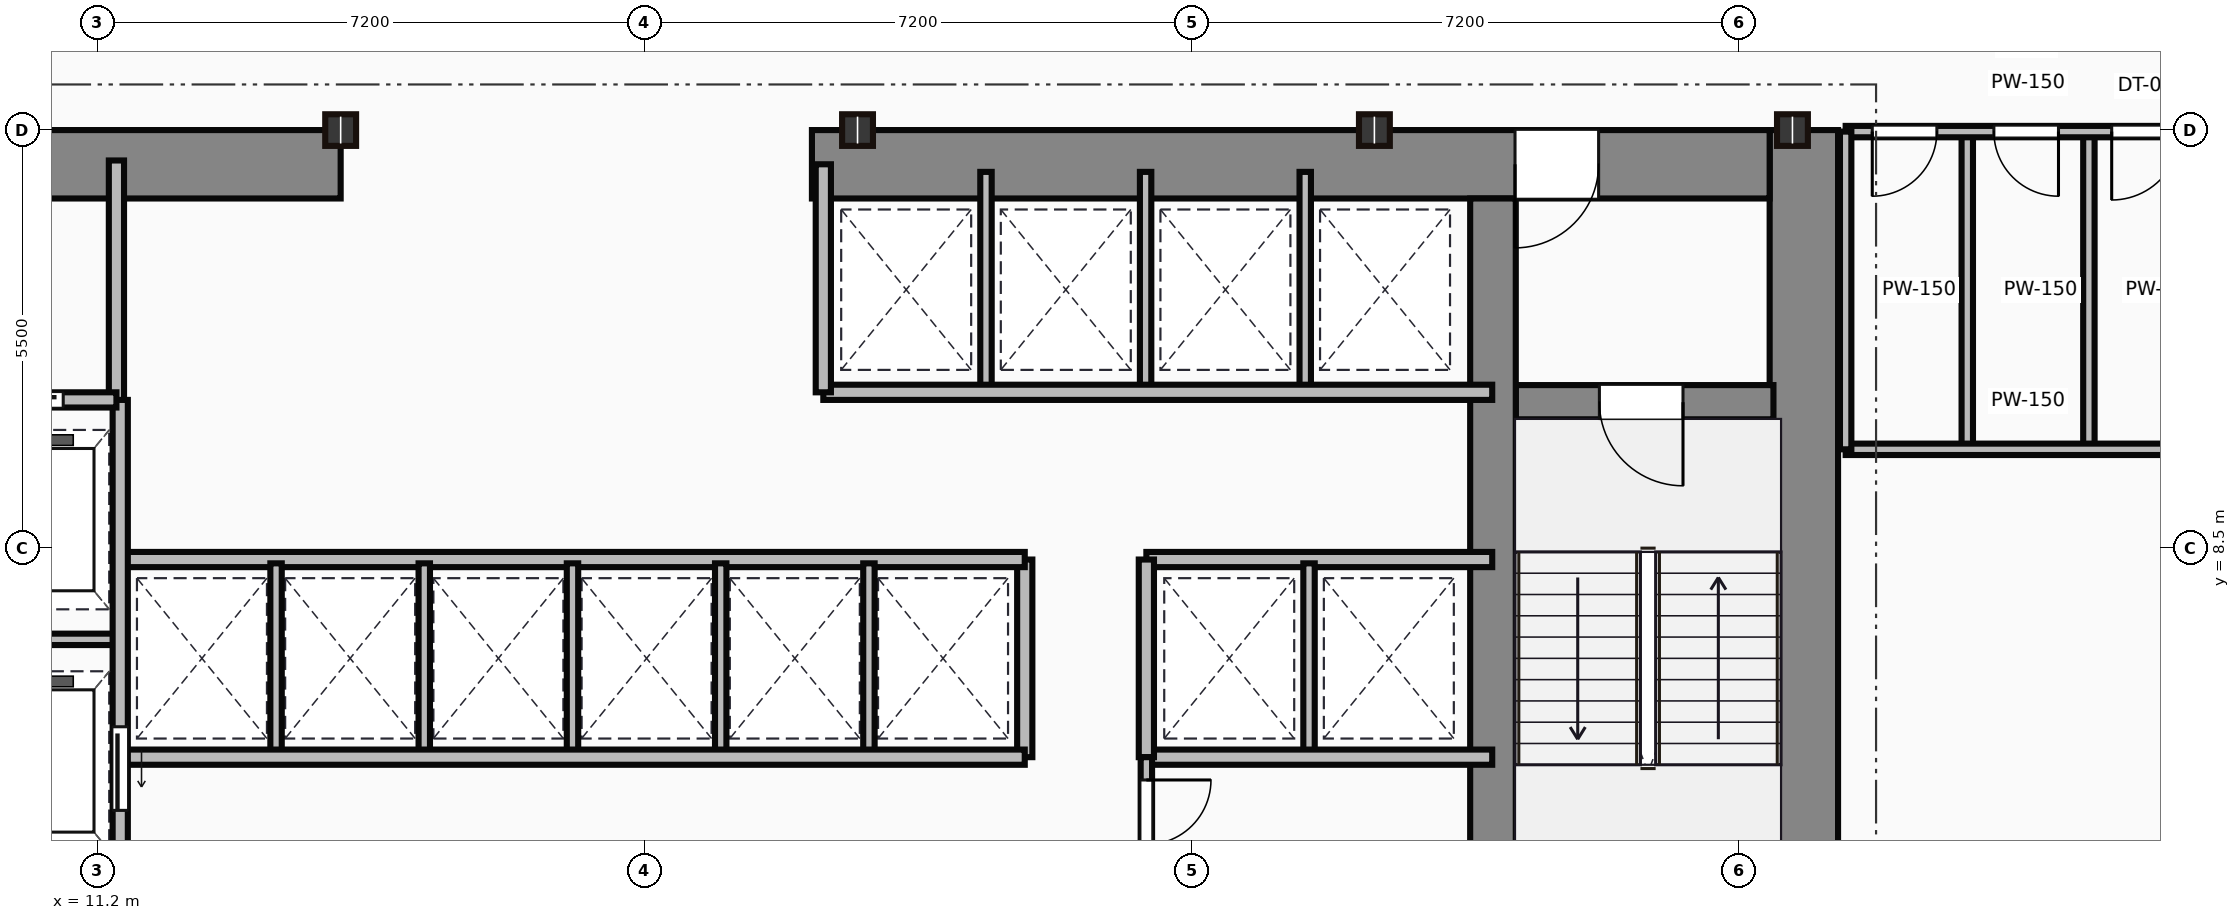
"""IFC4 building model, lengths in metres.
Left out: names, types, materials, properties, quantities, classifications, styles, units other than length and angle.
Written with IfcOpenShell. Run it as: python <this file> out.ifc"""

import sys

from ifc_helpers import new_model, si_unit, direction, frame, frame_2d, origin, origin_2d, place, context, subcontext, project, spatial, rectangle, i_section, extrude, source, transform, mapped, element, fill, save


model = new_model("IFC4")
c1 = context("Model", 3, precision=1e-05, world=origin(), true_north=direction((0.0, 1.0)))
c2 = subcontext(c1, "Body", "Model", "MODEL_VIEW")
j1 = project(units=[si_unit("LENGTHUNIT", "METRE"), si_unit("PLANEANGLEUNIT", "RADIAN")], contexts=[c1])
p1 = place(None, origin())
s1 = spatial("IfcSite", under=j1, at=p1, CompositionType="ELEMENT")
p2 = place(p1, origin())
s2 = spatial("IfcBuilding", under=s1, at=p2, CompositionType="ELEMENT")
p3 = place(p2, frame((0.0, 0.0, 58.05)))
s3 = spatial("IfcBuildingStorey", under=s2, at=p3, CompositionType="ELEMENT", Elevation=58.05)
m1 = source(origin(), c2, "Body", "SweptSolid", [
    extrude(rectangle(XDim=13.1, YDim=0.9, at=frame_2d((6.55, 0.0))), origin(), (0.0, 0.0, 1.0), 3.65),
])
p4 = place(p3, frame((33.65, 0.9, 0.0), z_axis=(0.0, 0.0, 1.0), x_axis=(0.0, 1.0, 0.0)))
e1 = element("IfcWall", 1, at=p4, inside=s3, PredefinedType="SHEAR", context=c2, shape_type="MappedRepresentation", body=[
    mapped(m1, transform((0.0, 0.0, 0.0))),
])
m2 = source(origin(), c2, "Body", "SweptSolid", [
    extrude(rectangle(XDim=9.1, YDim=0.9, at=frame_2d((4.55, 0.0))), origin(), (0.0, 0.0, 1.0), 3.65),
])
p5 = place(p3, frame((5.3, 13.55, 0.0), z_axis=(0.0, 0.0, 1.0), x_axis=(1.0, 0.0, 0.0)))
e2 = element("IfcWall", 2, at=p5, inside=s3, PredefinedType="SHEAR", context=c2, shape_type="MappedRepresentation", body=[
    mapped(m2, transform((0.0, 0.0, 0.0))),
])
p6 = place(p5, frame((4.1, 0.0, 0.0)))
e3 = element("IfcOpeningElement", 3, at=p6, cuts=e2, PredefinedType="OPENING", context=c2, shape_type="SweptSolid", body=[
    extrude(rectangle(XDim=1.1, YDim=2.15, at=frame_2d((0.55, 1.075))), frame((0.0, 0.46, 0.0), z_axis=(0.0, -1.0, 0.0), x_axis=(1.0, 0.0, 0.0)), (0.0, 0.0, 1.0), 0.92),
])
m3 = source(origin(), c2, "Body", "SweptSolid", [
    extrude(rectangle(XDim=12.6, YDim=0.9, at=frame_2d((6.3, 0.0))), origin(), (0.0, 0.0, 1.0), 3.65),
])
p7 = place(p3, frame((20.6, 13.55, 0.0), z_axis=(0.0, 0.0, 1.0), x_axis=(1.0, 0.0, 0.0)))
e4 = element("IfcWall", 4, at=p7, inside=s3, PredefinedType="SHEAR", context=c2, shape_type="MappedRepresentation", body=[
    mapped(m3, transform((0.0, 0.0, 0.0))),
])
p8 = place(p7, frame((9.25, 0.0, 0.0)))
e5 = element("IfcOpeningElement", 5, at=p8, cuts=e4, PredefinedType="OPENING", context=c2, shape_type="SweptSolid", body=[
    extrude(rectangle(XDim=1.1, YDim=2.15, at=frame_2d((0.55, 1.075))), frame((0.0, 0.46, 0.0), z_axis=(0.0, -1.0, 0.0), x_axis=(1.0, 0.0, 0.0)), (0.0, 0.0, 1.0), 0.92),
])
m4 = source(origin(), c2, "Body", "SweptSolid", [
    extrude(rectangle(XDim=12.2, YDim=0.6, at=frame_2d((6.1, 0.0))), origin(), (0.0, 0.0, 1.0), 3.65),
])
p9 = place(p3, frame((29.56, 0.9, 0.0), z_axis=(0.0, 0.0, 1.0), x_axis=(0.0, 1.0, 0.0)))
e6 = element("IfcWall", 6, at=p9, inside=s3, PredefinedType="SHEAR", context=c2, shape_type="MappedRepresentation", body=[
    mapped(m4, transform((0.0, 0.0, 0.0))),
])
m5 = source(origin(), c2, "Body", "SweptSolid", [
    extrude(rectangle(XDim=3.39, YDim=0.45, at=frame_2d((1.695, 0.0))), origin(), (0.0, 0.0, 1.0), 3.65),
])
p10 = place(p3, frame((29.86, 10.42, 0.0), z_axis=(0.0, 0.0, 1.0), x_axis=(1.0, 0.0, 0.0)))
e7 = element("IfcWall", 7, at=p10, inside=s3, PredefinedType="SHEAR", context=c2, shape_type="MappedRepresentation", body=[
    mapped(m5, transform((0.0, 0.0, 0.0))),
])
p11 = place(p10, frame((1.1, 0.0, 0.0)))
e8 = element("IfcOpeningElement", 8, at=p11, cuts=e7, PredefinedType="OPENING", context=c2, shape_type="SweptSolid", body=[
    extrude(rectangle(XDim=1.1, YDim=2.15, at=frame_2d((0.55, 1.075))), frame((0.0, 0.235, 0.0), z_axis=(0.0, -1.0, 0.0), x_axis=(1.0, 0.0, 0.0)), (0.0, 0.0, 1.0), 0.47),
])
m6 = source(origin(), c2, "Body", "SweptSolid", [
    extrude(i_section(OverallWidth=0.406, OverallDepth=0.416, WebThickness=0.03, FlangeThickness=0.048, at=origin_2d()), origin(), (0.0, 0.0, 1.0), 3.65),
])
for number, where, z_axis, x_axis in (
    (9, (14.4, 14.0, 0.0), (0.0, 0.0, 1.0), (1.0, 0.0, 0.0)),
    (10, (21.2, 14.0, 0.0), (0.0, 0.0, 1.0), (1.0, 0.0, 0.0)),
    (11, (28.0, 14.0, 0.0), (0.0, 0.0, 1.0), (1.0, 0.0, 0.0)),
    (12, (33.5, 14.0, 0.0), (0.0, 0.0, 1.0), (1.0, 0.0, 0.0)),
):
    element("IfcColumn", number, at=place(p3, frame(where, z_axis=z_axis, x_axis=x_axis)), inside=s3, PredefinedType="COLUMN", context=c2, shape_type="MappedRepresentation", body=[
        mapped(m6, transform((0.0, 0.0, 0.0))),
    ])
m7 = source(origin(), c2, "Body", "SweptSolid", [
    extrude(rectangle(XDim=3.18, YDim=0.2, at=frame_2d((1.59, 0.0))), origin(), (0.0, 0.0, 1.0), 3.4),
])
p12 = place(p3, frame((11.45, 10.42, 0.0), z_axis=(0.0, 0.0, 1.0), x_axis=(0.0, 1.0, 0.0)))
e13 = element("IfcWall", 13, at=p12, inside=s3, PredefinedType="PARTITIONING", context=c2, shape_type="MappedRepresentation", body=[
    mapped(m7, transform((0.0, 0.0, 0.0))),
])
m8 = source(origin(), c2, "Body", "SweptSolid", [
    extrude(rectangle(XDim=2.35, YDim=0.2, at=frame_2d((1.175, 0.0))), origin(), (0.0, 0.0, 1.0), 3.4),
])
p13 = place(p3, frame((9.1, 10.45, 0.0), z_axis=(0.0, 0.0, 1.0), x_axis=(1.0, 0.0, 0.0)))
e14 = element("IfcWall", 14, at=p13, inside=s3, PredefinedType="PARTITIONING", context=c2, shape_type="MappedRepresentation", body=[
    mapped(m8, transform((0.0, 0.0, 0.0))),
])
p14 = place(p13, frame((0.55, 0.0, 0.0)))
e15 = element("IfcOpeningElement", 15, at=p14, cuts=e14, PredefinedType="OPENING", context=c2, shape_type="SweptSolid", body=[
    extrude(rectangle(XDim=1.1, YDim=2.15, at=frame_2d((0.55, 1.075))), frame((0.0, 0.11, 0.0), z_axis=(0.0, -1.0, 0.0), x_axis=(1.0, 0.0, 0.0)), (0.0, 0.0, 1.0), 0.22),
])
m9 = source(origin(), c2, "Body", "SweptSolid", [
    extrude(rectangle(XDim=9.6, YDim=0.2, at=frame_2d((4.8, 0.0))), origin(), (0.0, 0.0, 1.0), 3.4),
])
p15 = place(p3, frame((11.5, 0.85, 0.0), z_axis=(0.0, 0.0, 1.0), x_axis=(0.0, 1.0, 0.0)))
e16 = element("IfcWall", 16, at=p15, inside=s3, PredefinedType="PARTITIONING", context=c2, shape_type="MappedRepresentation", body=[
    mapped(m9, transform((0.0, 0.0, 0.0))),
])
p16 = place(p15, frame((4.2, 0.0, 0.0)))
e17 = element("IfcOpeningElement", 17, at=p16, cuts=e16, PredefinedType="OPENING", context=c2, shape_type="SweptSolid", body=[
    extrude(rectangle(XDim=1.1, YDim=2.15, at=frame_2d((0.55, 1.075))), frame((0.0, 0.11, 0.0), z_axis=(0.0, -1.0, 0.0), x_axis=(1.0, 0.0, 0.0)), (0.0, 0.0, 1.0), 0.22),
])
p17 = place(p15, frame((0.9, 0.0, 0.0)))
e18 = element("IfcOpeningElement", 18, at=p17, cuts=e16, PredefinedType="OPENING", context=c2, shape_type="SweptSolid", body=[
    extrude(rectangle(XDim=1.2, YDim=2.15, at=frame_2d((0.6, 1.075))), frame((0.0, 0.11, 0.0), z_axis=(0.0, -1.0, 0.0), x_axis=(1.0, 0.0, 0.0)), (0.0, 0.0, 1.0), 0.22),
])
m10 = source(origin(), c2, "Body", "SweptSolid", [
    extrude(rectangle(XDim=2.4, YDim=0.15, at=frame_2d((1.2, 0.0))), origin(), (0.0, 0.0, 1.0), 3.4),
])
p18 = place(p3, frame((9.1, 7.3, 0.0), z_axis=(0.0, 0.0, 1.0), x_axis=(1.0, 0.0, 0.0)))
e19 = element("IfcWall", 19, at=p18, inside=s3, PredefinedType="PARTITIONING", context=c2, shape_type="MappedRepresentation", body=[
    mapped(m10, transform((0.0, 0.0, 0.0))),
])
m11 = source(origin(), c2, "Body", "SweptSolid", [
    extrude(rectangle(XDim=11.85, YDim=0.2, at=frame_2d((5.925, 0.0))), origin(), (0.0, 0.0, 1.0), 3.4),
])
for number, where, z_axis, x_axis in (
    (20, (11.55, 5.75, 0.0), (0.0, 0.0, 1.0), (1.0, 0.0, 0.0)),
    (21, (11.55, 8.35, 0.0), (0.0, 0.0, 1.0), (1.0, 0.0, 0.0)),
):
    element("IfcWall", number, at=place(p3, frame(where, z_axis=z_axis, x_axis=x_axis)), inside=s3, PredefinedType="PARTITIONING", context=c2, shape_type="MappedRepresentation", body=[
        mapped(m11, transform((0.0, 0.0, 0.0))),
    ])
m12 = source(origin(), c2, "Body", "SweptSolid", [
    extrude(rectangle(XDim=2.6, YDim=0.2, at=frame_2d((1.3, 0.0))), origin(), (0.0, 0.0, 1.0), 3.4),
])
p19 = place(p3, frame((23.4, 5.75, 0.0), z_axis=(0.0, 0.0, 1.0), x_axis=(0.0, 1.0, 0.0)))
e22 = element("IfcWall", 22, at=p19, inside=s3, PredefinedType="PARTITIONING", context=c2, shape_type="MappedRepresentation", body=[
    mapped(m12, transform((0.0, 0.0, 0.0))),
])
m13 = source(origin(), c2, "Body", "SweptSolid", [
    extrude(rectangle(XDim=2.5, YDim=0.15, at=frame_2d((1.25, 0.0))), origin(), (0.0, 0.0, 1.0), 3.4),
])
for number, where, z_axis, x_axis in (
    (23, (13.55, 5.8, 0.0), (0.0, 0.0, 1.0), (0.0, 1.0, 0.0)),
    (24, (15.5, 5.8, 0.0), (0.0, 0.0, 1.0), (0.0, 1.0, 0.0)),
    (25, (17.45, 5.8, 0.0), (0.0, 0.0, 1.0), (0.0, 1.0, 0.0)),
    (26, (19.4, 5.8, 0.0), (0.0, 0.0, 1.0), (0.0, 1.0, 0.0)),
    (27, (21.35, 5.8, 0.0), (0.0, 0.0, 1.0), (0.0, 1.0, 0.0)),
):
    element("IfcWall", number, at=place(p3, frame(where, z_axis=z_axis, x_axis=x_axis)), inside=s3, PredefinedType="PARTITIONING", context=c2, shape_type="MappedRepresentation", body=[
        mapped(m13, transform((0.0, 0.0, 0.0))),
    ])
m14 = source(origin(), c2, "Body", "SweptSolid", [
    extrude(rectangle(XDim=8.8, YDim=0.2, at=frame_2d((4.4, 0.0))), origin(), (0.0, 0.0, 1.0), 3.4),
])
p20 = place(p3, frame((20.75, 10.55, 0.0), z_axis=(0.0, 0.0, 1.0), x_axis=(1.0, 0.0, 0.0)))
e28 = element("IfcWall", 28, at=p20, inside=s3, PredefinedType="PARTITIONING", context=c2, shape_type="MappedRepresentation", body=[
    mapped(m14, transform((0.0, 0.0, 0.0))),
])
m15 = source(origin(), c2, "Body", "SweptSolid", [
    extrude(rectangle(XDim=3.0, YDim=0.2, at=frame_2d((1.5, 0.0))), origin(), (0.0, 0.0, 1.0), 3.4),
])
p21 = place(p3, frame((20.75, 10.55, 0.0), z_axis=(0.0, 0.0, 1.0), x_axis=(0.0, 1.0, 0.0)))
e29 = element("IfcWall", 29, at=p21, inside=s3, PredefinedType="PARTITIONING", context=c2, shape_type="MappedRepresentation", body=[
    mapped(m15, transform((0.0, 0.0, 0.0))),
])
m16 = source(origin(), c2, "Body", "SweptSolid", [
    extrude(rectangle(XDim=2.85, YDim=0.15, at=frame_2d((1.425, 0.0))), origin(), (0.0, 0.0, 1.0), 3.4),
])
for number, where, z_axis, x_axis in (
    (30, (22.89, 10.6, 0.0), (0.0, 0.0, 1.0), (0.0, 1.0, 0.0)),
    (31, (24.99, 10.6, 0.0), (0.0, 0.0, 1.0), (0.0, 1.0, 0.0)),
    (32, (27.09, 10.6, 0.0), (0.0, 0.0, 1.0), (0.0, 1.0, 0.0)),
):
    element("IfcWall", number, at=place(p3, frame(where, z_axis=z_axis, x_axis=x_axis)), inside=s3, PredefinedType="PARTITIONING", context=c2, shape_type="MappedRepresentation", body=[
        mapped(m16, transform((0.0, 0.0, 0.0))),
    ])
m17 = source(origin(), c2, "Body", "SweptSolid", [
    extrude(rectangle(XDim=4.55, YDim=0.2, at=frame_2d((2.275, 0.0))), origin(), (0.0, 0.0, 1.0), 3.4),
])
for number, where, z_axis, x_axis in (
    (33, (25.0, 8.35, 0.0), (0.0, 0.0, 1.0), (1.0, 0.0, 0.0)),
    (34, (25.0, 5.75, 0.0), (0.0, 0.0, 1.0), (1.0, 0.0, 0.0)),
):
    element("IfcWall", number, at=place(p3, frame(where, z_axis=z_axis, x_axis=x_axis)), inside=s3, PredefinedType="PARTITIONING", context=c2, shape_type="MappedRepresentation", body=[
        mapped(m17, transform((0.0, 0.0, 0.0))),
    ])
p22 = place(p3, frame((25.0, 5.75, 0.0), z_axis=(0.0, 0.0, 1.0), x_axis=(0.0, 1.0, 0.0)))
e35 = element("IfcWall", 35, at=p22, inside=s3, PredefinedType="PARTITIONING", context=c2, shape_type="MappedRepresentation", body=[
    mapped(m12, transform((0.0, 0.0, 0.0))),
])
p23 = place(p3, frame((27.14, 5.8, 0.0), z_axis=(0.0, 0.0, 1.0), x_axis=(0.0, 1.0, 0.0)))
e36 = element("IfcWall", 36, at=p23, inside=s3, PredefinedType="PARTITIONING", context=c2, shape_type="MappedRepresentation", body=[
    mapped(m13, transform((0.0, 0.0, 0.0))),
])
m18 = source(origin(), c2, "Body", "SweptSolid", [
    extrude(rectangle(XDim=4.9, YDim=0.15, at=frame_2d((2.45, 0.0))), origin(), (0.0, 0.0, 1.0), 3.4),
])
p24 = place(p3, frame((25.0, 0.85, 0.0), z_axis=(0.0, 0.0, 1.0), x_axis=(0.0, 1.0, 0.0)))
e37 = element("IfcWall", 37, at=p24, inside=s3, PredefinedType="PARTITIONING", context=c2, shape_type="MappedRepresentation", body=[
    mapped(m18, transform((0.0, 0.0, 0.0))),
])
p25 = place(p24, frame((2.0, 0.0, 0.0)))
e38 = element("IfcOpeningElement", 38, at=p25, cuts=e37, PredefinedType="OPENING", context=c2, shape_type="SweptSolid", body=[
    extrude(rectangle(XDim=0.95, YDim=2.15, at=frame_2d((0.475, 1.075))), frame((0.0, 0.085, 0.0), z_axis=(0.0, -1.0, 0.0), x_axis=(1.0, 0.0, 0.0)), (0.0, 0.0, 1.0), 0.17),
])
p26 = place(p24, frame((3.75, 0.0, 0.0)))
e39 = element("IfcOpeningElement", 39, at=p26, cuts=e37, PredefinedType="OPENING", context=c2, shape_type="SweptSolid", body=[
    extrude(rectangle(XDim=0.85, YDim=2.15, at=frame_2d((0.425, 1.075))), frame((0.0, 0.085, 0.0), z_axis=(0.0, -1.0, 0.0), x_axis=(1.0, 0.0, 0.0)), (0.0, 0.0, 1.0), 0.17),
])
m19 = source(origin(), c2, "Body", "SweptSolid", [
    extrude(rectangle(XDim=4.8, YDim=0.15, at=frame_2d((2.4, 0.0))), origin(), (0.0, 0.0, 1.0), 2.625),
])
p27 = place(p3, frame((34.2, 13.98, 0.0), z_axis=(0.0, 0.0, 1.0), x_axis=(1.0, 0.0, 0.0)))
e40 = element("IfcWall", 40, at=p27, inside=s3, PredefinedType="PARTITIONING", context=c2, shape_type="MappedRepresentation", body=[
    mapped(m19, transform((0.0, 0.0, 0.0))),
])
p28 = place(p27, frame((0.35, 0.0, 0.0)))
e41 = element("IfcOpeningElement", 41, at=p28, cuts=e40, PredefinedType="OPENING", context=c2, shape_type="SweptSolid", body=[
    extrude(rectangle(XDim=0.85, YDim=2.1, at=frame_2d((0.425, 1.05))), frame((0.0, 0.085, 0.0), z_axis=(0.0, -1.0, 0.0), x_axis=(1.0, 0.0, 0.0)), (0.0, 0.0, 1.0), 0.17),
])
p29 = place(p27, frame((1.95, 0.0, 0.0)))
e42 = element("IfcOpeningElement", 42, at=p29, cuts=e40, PredefinedType="OPENING", context=c2, shape_type="SweptSolid", body=[
    extrude(rectangle(XDim=0.85, YDim=2.1, at=frame_2d((0.425, 1.05))), frame((0.0, 0.085, 0.0), z_axis=(0.0, -1.0, 0.0), x_axis=(1.0, 0.0, 0.0)), (0.0, 0.0, 1.0), 0.17),
])
p30 = place(p27, frame((3.5, 0.0, 0.0)))
e43 = element("IfcOpeningElement", 43, at=p30, cuts=e40, PredefinedType="OPENING", context=c2, shape_type="SweptSolid", body=[
    extrude(rectangle(XDim=0.9, YDim=2.1, at=frame_2d((0.45, 1.05))), frame((0.0, 0.085, 0.0), z_axis=(0.0, -1.0, 0.0), x_axis=(1.0, 0.0, 0.0)), (0.0, 0.0, 1.0), 0.17),
])
m20 = source(origin(), c2, "Body", "SweptSolid", [
    extrude(rectangle(XDim=4.8, YDim=0.15, at=frame_2d((2.4, 0.0))), origin(), (0.0, 0.0, 1.0), 3.4),
])
p31 = place(p3, frame((34.2, 9.8, 0.0), z_axis=(0.0, 0.0, 1.0), x_axis=(1.0, 0.0, 0.0)))
e44 = element("IfcWall", 44, at=p31, inside=s3, PredefinedType="PARTITIONING", context=c2, shape_type="MappedRepresentation", body=[
    mapped(m20, transform((0.0, 0.0, 0.0))),
])
m21 = source(origin(), c2, "Body", "SweptSolid", [
    extrude(rectangle(XDim=4.18, YDim=0.15, at=frame_2d((2.09, 0.0))), origin(), (0.0, 0.0, 1.0), 3.4),
])
for number, where, z_axis, x_axis in (
    (45, (34.2, 9.8, 0.0), (0.0, 0.0, 1.0), (0.0, 1.0, 0.0)),
    (46, (35.8, 9.8, 0.0), (0.0, 0.0, 1.0), (0.0, 1.0, 0.0)),
    (47, (37.4, 9.8, 0.0), (0.0, 0.0, 1.0), (0.0, 1.0, 0.0)),
):
    element("IfcWall", number, at=place(p3, frame(where, z_axis=z_axis, x_axis=x_axis)), inside=s3, PredefinedType="PARTITIONING", context=c2, shape_type="MappedRepresentation", body=[
        mapped(m21, transform((0.0, 0.0, 0.0))),
    ])
m22 = source(origin(), c2, "Body", "SweptSolid", [
    extrude(rectangle(XDim=1.1, YDim=2.15, at=frame_2d((0.55, 1.075))), frame((0.0, 0.025, 0.0), z_axis=(0.0, -1.0, 0.0), x_axis=(1.0, 0.0, 0.0)), (0.0, 0.0, 1.0), 0.05),
])
p32 = place(p11, frame((1.1, 0.0, 0.0), z_axis=(0.0, 0.0, 1.0), x_axis=(-1.0, 0.0, 0.0)))
e48 = element("IfcDoor", 48, at=p32, inside=s3, OperationType="SINGLE_SWING_RIGHT", PredefinedType="DOOR", context=c2, shape_type="MappedRepresentation", body=[
    mapped(m22, transform((0.0, 0.0, 0.0))),
])
fill(e8, e48)
p33 = place(p8, origin())
e49 = element("IfcDoor", 49, at=p33, inside=s3, OperationType="SINGLE_SWING_LEFT", PredefinedType="DOOR", context=c2, shape_type="MappedRepresentation", body=[
    mapped(m22, transform((0.0, 0.0, 0.0))),
])
fill(e5, e49)
p34 = place(p14, origin())
e50 = element("IfcDoor", 50, at=p34, inside=s3, OperationType="SLIDING_TO_LEFT", PredefinedType="DOOR", context=c2, shape_type="MappedRepresentation", body=[
    mapped(m22, transform((0.0, 0.0, 0.0))),
])
fill(e15, e50)
p35 = place(p16, frame((1.1, 0.0, 0.0), z_axis=(0.0, 0.0, 1.0), x_axis=(-1.0, 0.0, 0.0)))
e51 = element("IfcDoor", 51, at=p35, inside=s3, OperationType="SLIDING_TO_LEFT", PredefinedType="DOOR", context=c2, shape_type="MappedRepresentation", body=[
    mapped(m22, transform((0.0, 0.0, 0.0))),
])
fill(e17, e51)
m23 = source(origin(), c2, "Body", "SweptSolid", [
    extrude(rectangle(XDim=0.85, YDim=2.15, at=frame_2d((0.425, 1.075))), frame((0.0, 0.025, 0.0), z_axis=(0.0, -1.0, 0.0), x_axis=(1.0, 0.0, 0.0)), (0.0, 0.0, 1.0), 0.05),
])
p36 = place(p26, origin())
e52 = element("IfcDoor", 52, at=p36, inside=s3, OperationType="SINGLE_SWING_RIGHT", PredefinedType="DOOR", context=c2, shape_type="MappedRepresentation", body=[
    mapped(m23, transform((0.0, 0.0, 0.0))),
])
fill(e39, e52)
m24 = source(origin(), c2, "Body", "SweptSolid", [
    extrude(rectangle(XDim=0.85, YDim=2.1, at=frame_2d((0.425, 1.05))), frame((0.0, 0.025, 0.0), z_axis=(0.0, -1.0, 0.0), x_axis=(1.0, 0.0, 0.0)), (0.0, 0.0, 1.0), 0.05),
])
p37 = place(p28, frame((0.85, 0.0, 0.0), z_axis=(0.0, 0.0, 1.0), x_axis=(-1.0, 0.0, 0.0)))
e53 = element("IfcDoor", 53, at=p37, inside=s3, OperationType="SINGLE_SWING_LEFT", PredefinedType="DOOR", context=c2, shape_type="MappedRepresentation", body=[
    mapped(m24, transform((0.0, 0.0, 0.0))),
])
fill(e41, e53)
p38 = place(p29, frame((0.85, 0.0, 0.0), z_axis=(0.0, 0.0, 1.0), x_axis=(-1.0, 0.0, 0.0)))
e54 = element("IfcDoor", 54, at=p38, inside=s3, OperationType="SINGLE_SWING_RIGHT", PredefinedType="DOOR", context=c2, shape_type="MappedRepresentation", body=[
    mapped(m24, transform((0.0, 0.0, 0.0))),
])
fill(e42, e54)
m25 = source(origin(), c2, "Body", "SweptSolid", [
    extrude(rectangle(XDim=0.9, YDim=2.1, at=frame_2d((0.45, 1.05))), frame((0.0, 0.025, 0.0), z_axis=(0.0, -1.0, 0.0), x_axis=(1.0, 0.0, 0.0)), (0.0, 0.0, 1.0), 0.05),
])
p39 = place(p30, frame((0.9, 0.0, 0.0), z_axis=(0.0, 0.0, 1.0), x_axis=(-1.0, 0.0, 0.0)))
e55 = element("IfcDoor", 55, at=p39, inside=s3, OperationType="SINGLE_SWING_LEFT", PredefinedType="DOOR", context=c2, shape_type="MappedRepresentation", body=[
    mapped(m25, transform((0.0, 0.0, 0.0))),
])
fill(e43, e55)
save(model, sys.argv[1])
